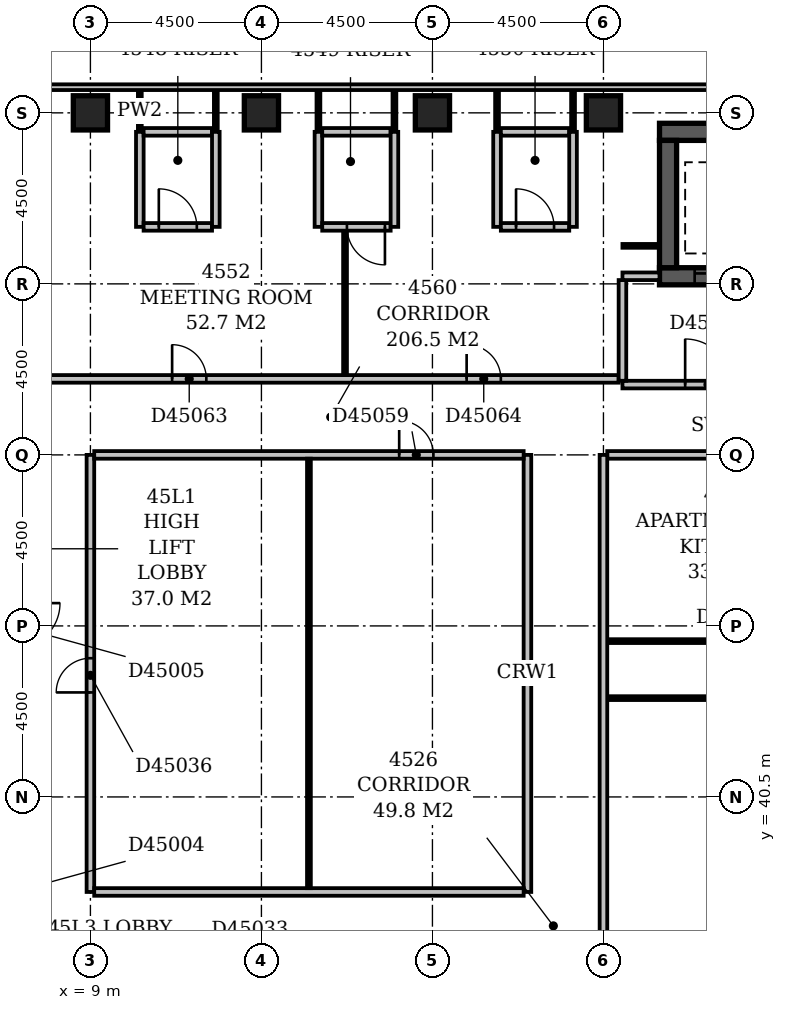
"""IFC4 building model, lengths in metres.
Left out: names, types, materials, properties, quantities, classifications, styles, units other than length and angle.
Written with IfcOpenShell. Run it as: python <this file> out.ifc"""

import sys

from ifc_helpers import new_model, si_unit, direction, frame, frame_2d, origin, origin_2d, place, context, subcontext, project, spatial, rectangle, extrude, element, fill, save


model = new_model("IFC4")
c1 = context("Model", 3, precision=1e-05, world=origin(), true_north=direction((0.0, 1.0)))
c2 = subcontext(c1, "Body", "Model", "MODEL_VIEW")
j1 = project(units=[si_unit("LENGTHUNIT", "METRE"), si_unit("PLANEANGLEUNIT", "RADIAN")], contexts=[c1])
p1 = place(None, origin())
s1 = spatial("IfcSite", under=j1, at=p1, CompositionType="ELEMENT")
p2 = place(p1, origin())
s2 = spatial("IfcBuilding", under=s1, at=p2, CompositionType="ELEMENT")
p3 = place(p2, frame((0.0, 0.0, 179.0)))
s3 = spatial("IfcBuildingStorey", under=s2, at=p3, CompositionType="ELEMENT", Elevation=179.0)
p4 = place(p3, frame((23.975, 54.2, -0.3), z_axis=(0.0, 0.0, 1.0), x_axis=(1.0, 0.0, 0.0)))
e1 = element("IfcWall", 1, at=p4, inside=s3, PredefinedType="SHEAR", context=c2, shape_type="SweptSolid", body=[
    extrude(rectangle(XDim=2.95, YDim=0.45, at=frame_2d((1.475, 0.0))), origin(), (0.0, 0.0, 1.0), 3.6),
])
p5 = place(p4, frame((0.925, 0.0, 0.3)))
e2 = element("IfcOpeningElement", 2, at=p5, cuts=e1, PredefinedType="OPENING", context=c2, shape_type="SweptSolid", body=[
    extrude(rectangle(XDim=1.1, YDim=2.1, at=frame_2d((0.55, 1.05))), frame((0.0, 0.237, 0.0), z_axis=(0.0, -1.0, 0.0), x_axis=(1.0, 0.0, 0.0)), (0.0, 0.0, 1.0), 0.474),
])
p6 = place(p3, frame((23.975, 58.0, -0.3), z_axis=(0.0, 0.0, 1.0), x_axis=(1.0, 0.0, 0.0)))
e3 = element("IfcWall", 3, at=p6, inside=s3, PredefinedType="SHEAR", context=c2, shape_type="SweptSolid", body=[
    extrude(rectangle(XDim=2.95, YDim=0.45, at=frame_2d((1.475, 0.0))), origin(), (0.0, 0.0, 1.0), 3.6),
])
p7 = place(p3, frame((24.2, 54.425, -0.3), z_axis=(0.0, 0.0, 1.0), x_axis=(0.0, 1.0, 0.0)))
e4 = element("IfcWall", 4, at=p7, inside=s3, PredefinedType="SHEAR", context=c2, shape_type="SweptSolid", body=[
    extrude(rectangle(XDim=3.35, YDim=0.45, at=frame_2d((1.675, 0.0))), origin(), (0.0, 0.0, 1.0), 3.6),
])
for number, where, z_axis, x_axis in (
    (5, (9.0, 58.5, -0.3), (0.0, 0.0, 1.0), (1.0, 0.0, 0.0)),
    (6, (13.5, 58.5, -0.3), (0.0, 0.0, 1.0), (1.0, 0.0, 0.0)),
    (7, (18.0, 58.5, -0.3), (0.0, 0.0, 1.0), (1.0, 0.0, 0.0)),
    (8, (22.5, 58.5, -0.3), (0.0, 0.0, 1.0), (1.0, 0.0, 0.0)),
):
    element("IfcColumn", number, at=place(p3, frame(where, z_axis=z_axis, x_axis=x_axis)), inside=s3, PredefinedType="COLUMN", context=c2, shape_type="SweptSolid", body=[
        extrude(rectangle(XDim=0.9, YDim=0.9, at=origin_2d()), origin(), (0.0, 0.0, 1.0), 3.6),
    ])
p8 = place(p3, frame((68.1, 59.175, 0.0), z_axis=(0.0, 0.0, 1.0), x_axis=(-1.0, 0.0, 0.0)))
e9 = element("IfcWall", 9, at=p8, inside=s3, PredefinedType="STANDARD", context=c2, shape_type="SweptSolid", body=[
    extrude(rectangle(XDim=68.85, YDim=0.15, at=frame_2d((34.425, 0.0))), origin(), (0.0, 0.0, 1.0), 2.7),
])
p9 = place(p3, frame((23.0, 51.35, 0.0), z_axis=(0.0, 0.0, 1.0), x_axis=(1.0, 0.0, 0.0)))
e10 = element("IfcWall", 10, at=p9, inside=s3, PredefinedType="PARTITIONING", context=c2, shape_type="SweptSolid", body=[
    extrude(rectangle(XDim=4.8, YDim=0.2, at=frame_2d((2.4, 0.0))), origin(), (0.0, 0.0, 1.0), 3.3),
])
p10 = place(p9, frame((1.65, 0.0, 0.0)))
e11 = element("IfcOpeningElement", 11, at=p10, cuts=e10, PredefinedType="OPENING", context=c2, shape_type="SweptSolid", body=[
    extrude(rectangle(XDim=1.2, YDim=2.1, at=frame_2d((0.6, 1.05))), frame((0.0, 0.112, 0.0), z_axis=(0.0, -1.0, 0.0), x_axis=(1.0, 0.0, 0.0)), (0.0, 0.0, 1.0), 0.224),
])
p11 = place(p3, frame((23.0, 54.2, 0.0), z_axis=(0.0, 0.0, 1.0), x_axis=(1.0, 0.0, 0.0)))
e12 = element("IfcWall", 12, at=p11, inside=s3, PredefinedType="PARTITIONING", context=c2, shape_type="SweptSolid", body=[
    extrude(rectangle(XDim=0.975, YDim=0.2, at=frame_2d((0.488, 0.0))), origin(), (0.0, 0.0, 1.0), 3.3),
])
p12 = place(p3, frame((23.0, 51.45, 0.0), z_axis=(0.0, 0.0, 1.0), x_axis=(0.0, 1.0, 0.0)))
e13 = element("IfcWall", 13, at=p12, inside=s3, PredefinedType="PARTITIONING", context=c2, shape_type="SweptSolid", body=[
    extrude(rectangle(XDim=2.65, YDim=0.2, at=frame_2d((1.325, 0.0))), origin(), (0.0, 0.0, 1.0), 3.3),
])
p13 = place(p3, frame((22.5, 36.45, 0.0), z_axis=(0.0, 0.0, 1.0), x_axis=(0.0, 1.0, 0.0)))
e14 = element("IfcWall", 14, at=p13, inside=s3, PredefinedType="PARTITIONING", context=c2, shape_type="SweptSolid", body=[
    extrude(rectangle(XDim=13.05, YDim=0.2, at=frame_2d((6.525, 0.0))), origin(), (0.0, 0.0, 1.0), 3.3),
])
p14 = place(p3, frame((9.0, 38.0, 0.0), z_axis=(0.0, 0.0, 1.0), x_axis=(0.0, 1.0, 0.0)))
e15 = element("IfcWall", 15, at=p14, inside=s3, PredefinedType="PARTITIONING", context=c2, shape_type="SweptSolid", body=[
    extrude(rectangle(XDim=11.5, YDim=0.2, at=frame_2d((5.75, 0.0))), origin(), (0.0, 0.0, 1.0), 3.3),
])
p15 = place(p14, frame((5.25, 0.0, 0.0)))
e16 = element("IfcOpeningElement", 16, at=p15, cuts=e15, PredefinedType="OPENING", context=c2, shape_type="SweptSolid", body=[
    extrude(rectangle(XDim=0.9, YDim=2.1, at=frame_2d((0.45, 1.05))), frame((0.0, 0.112, 0.0), z_axis=(0.0, -1.0, 0.0), x_axis=(1.0, 0.0, 0.0)), (0.0, 0.0, 1.0), 0.224),
])
p16 = place(p3, frame((9.1, 38.0, 0.0), z_axis=(0.0, 0.0, 1.0), x_axis=(1.0, 0.0, 0.0)))
e17 = element("IfcWall", 17, at=p16, inside=s3, PredefinedType="PARTITIONING", context=c2, shape_type="SweptSolid", body=[
    extrude(rectangle(XDim=11.3, YDim=0.2, at=frame_2d((5.65, 0.0))), origin(), (0.0, 0.0, 1.0), 3.3),
])
p17 = place(p3, frame((20.5, 38.0, 0.0), z_axis=(0.0, 0.0, 1.0), x_axis=(0.0, 1.0, 0.0)))
e18 = element("IfcWall", 18, at=p17, inside=s3, PredefinedType="PARTITIONING", context=c2, shape_type="SweptSolid", body=[
    extrude(rectangle(XDim=11.5, YDim=0.2, at=frame_2d((5.75, 0.0))), origin(), (0.0, 0.0, 1.0), 3.3),
])
p18 = place(p3, frame((14.75, 38.1, 0.0), z_axis=(0.0, 0.0, 1.0), x_axis=(0.0, 1.0, 0.0)))
e19 = element("IfcWall", 19, at=p18, inside=s3, PredefinedType="PARTITIONING", context=c2, shape_type="SweptSolid", body=[
    extrude(rectangle(XDim=11.3, YDim=0.1, at=frame_2d((5.65, 0.0))), origin(), (0.0, 0.0, 1.0), 3.3),
])
p19 = place(p3, frame((22.6, 43.1, 0.0), z_axis=(0.0, 0.0, 1.0), x_axis=(1.0, 0.0, 0.0)))
e20 = element("IfcWall", 20, at=p19, inside=s3, PredefinedType="PARTITIONING", context=c2, shape_type="SweptSolid", body=[
    extrude(rectangle(XDim=17.8, YDim=0.1, at=frame_2d((8.9, 0.0))), origin(), (0.0, 0.0, 1.0), 3.3),
])
p20 = place(p19, frame((3.9, 0.0, 0.0)))
e21 = element("IfcOpeningElement", 21, at=p20, cuts=e20, PredefinedType="OPENING", context=c2, shape_type="SweptSolid", body=[
    extrude(rectangle(XDim=0.9, YDim=2.1, at=frame_2d((0.45, 1.05))), frame((0.0, 0.062, 0.0), z_axis=(0.0, -1.0, 0.0), x_axis=(1.0, 0.0, 0.0)), (0.0, 0.0, 1.0), 0.124),
])
p21 = place(p19, frame((10.7, 0.0, 0.0)))
e22 = element("IfcOpeningElement", 22, at=p21, cuts=e20, PredefinedType="OPENING", context=c2, shape_type="SweptSolid", body=[
    extrude(rectangle(XDim=0.9, YDim=2.1, at=frame_2d((0.45, 1.05))), frame((0.0, 0.062, 0.0), z_axis=(0.0, -1.0, 0.0), x_axis=(1.0, 0.0, 0.0)), (0.0, 0.0, 1.0), 0.124),
])
p22 = place(p19, frame((14.05, 0.0, 0.0)))
e23 = element("IfcOpeningElement", 23, at=p22, cuts=e20, PredefinedType="OPENING", context=c2, shape_type="SweptSolid", body=[
    extrude(rectangle(XDim=0.9, YDim=2.1, at=frame_2d((0.45, 1.05))), frame((0.0, 0.062, 0.0), z_axis=(0.0, -1.0, 0.0), x_axis=(1.0, 0.0, 0.0)), (0.0, 0.0, 1.0), 0.124),
])
p23 = place(p3, frame((22.6, 44.6, 0.0), z_axis=(0.0, 0.0, 1.0), x_axis=(1.0, 0.0, 0.0)))
e24 = element("IfcWall", 24, at=p23, inside=s3, PredefinedType="PARTITIONING", context=c2, shape_type="SweptSolid", body=[
    extrude(rectangle(XDim=6.75, YDim=0.1, at=frame_2d((3.375, 0.0))), origin(), (0.0, 0.0, 1.0), 3.3),
])
p24 = place(p23, frame((2.9, 0.0, 0.0)))
e25 = element("IfcOpeningElement", 25, at=p24, cuts=e24, PredefinedType="OPENING", context=c2, shape_type="SweptSolid", body=[
    extrude(rectangle(XDim=0.9, YDim=2.1, at=frame_2d((0.45, 1.05))), frame((0.0, 0.062, 0.0), z_axis=(0.0, -1.0, 0.0), x_axis=(1.0, 0.0, 0.0)), (0.0, 0.0, 1.0), 0.124),
])
p25 = place(p3, frame((9.1, 49.5, 0.0), z_axis=(0.0, 0.0, 1.0), x_axis=(1.0, 0.0, 0.0)))
e26 = element("IfcWall", 26, at=p25, inside=s3, PredefinedType="PARTITIONING", context=c2, shape_type="SweptSolid", body=[
    extrude(rectangle(XDim=11.3, YDim=0.2, at=frame_2d((5.65, 0.0))), origin(), (0.0, 0.0, 1.0), 3.3),
])
p26 = place(p25, frame((8.025, 0.0, 0.0)))
e27 = element("IfcOpeningElement", 27, at=p26, cuts=e26, PredefinedType="OPENING", context=c2, shape_type="SweptSolid", body=[
    extrude(rectangle(XDim=0.9, YDim=2.1, at=frame_2d((0.45, 1.05))), frame((0.0, 0.112, 0.0), z_axis=(0.0, -1.0, 0.0), x_axis=(1.0, 0.0, 0.0)), (0.0, 0.0, 1.0), 0.224),
])
p27 = place(p3, frame((22.6, 49.5, 0.0), z_axis=(0.0, 0.0, 1.0), x_axis=(1.0, 0.0, 0.0)))
e28 = element("IfcWall", 28, at=p27, inside=s3, PredefinedType="PARTITIONING", context=c2, shape_type="SweptSolid", body=[
    extrude(rectangle(XDim=44.45, YDim=0.2, at=frame_2d((22.225, 0.0))), origin(), (0.0, 0.0, 1.0), 3.3),
])
p28 = place(p27, frame((7.1, 0.0, 0.0)))
e29 = element("IfcOpeningElement", 29, at=p28, cuts=e28, PredefinedType="OPENING", context=c2, shape_type="SweptSolid", body=[
    extrude(rectangle(XDim=1.0, YDim=2.1, at=frame_2d((0.5, 1.05))), frame((0.0, 0.112, 0.0), z_axis=(0.0, -1.0, 0.0), x_axis=(1.0, 0.0, 0.0)), (0.0, 0.0, 1.0), 0.224),
])
p29 = place(p27, frame((26.1, 0.0, 0.0)))
e30 = element("IfcOpeningElement", 30, at=p29, cuts=e28, PredefinedType="OPENING", context=c2, shape_type="SweptSolid", body=[
    extrude(rectangle(XDim=1.0, YDim=2.1, at=frame_2d((0.5, 1.05))), frame((0.0, 0.112, 0.0), z_axis=(0.0, -1.0, 0.0), x_axis=(1.0, 0.0, 0.0)), (0.0, 0.0, 1.0), 0.224),
])
p30 = place(p27, frame((31.7, 0.0, 0.0)))
e31 = element("IfcOpeningElement", 31, at=p30, cuts=e28, PredefinedType="OPENING", context=c2, shape_type="SweptSolid", body=[
    extrude(rectangle(XDim=1.0, YDim=2.1, at=frame_2d((0.5, 1.05))), frame((0.0, 0.112, 0.0), z_axis=(0.0, -1.0, 0.0), x_axis=(1.0, 0.0, 0.0)), (0.0, 0.0, 1.0), 0.224),
])
p31 = place(p3, frame((7.6, 51.5, 0.0), z_axis=(0.0, 0.0, 1.0), x_axis=(1.0, 0.0, 0.0)))
e32 = element("IfcWall", 32, at=p31, inside=s3, PredefinedType="PARTITIONING", context=c2, shape_type="SweptSolid", body=[
    extrude(rectangle(XDim=15.3, YDim=0.2, at=frame_2d((7.65, 0.0))), origin(), (0.0, 0.0, 1.0), 3.3),
])
p32 = place(p31, frame((3.55, 0.0, 0.0)))
e33 = element("IfcOpeningElement", 33, at=p32, cuts=e32, PredefinedType="OPENING", context=c2, shape_type="SweptSolid", body=[
    extrude(rectangle(XDim=0.9, YDim=2.1, at=frame_2d((0.45, 1.05))), frame((0.0, 0.112, 0.0), z_axis=(0.0, -1.0, 0.0), x_axis=(1.0, 0.0, 0.0)), (0.0, 0.0, 1.0), 0.224),
])
p33 = place(p31, frame((11.3, 0.0, 0.0)))
e34 = element("IfcOpeningElement", 34, at=p33, cuts=e32, PredefinedType="OPENING", context=c2, shape_type="SweptSolid", body=[
    extrude(rectangle(XDim=0.9, YDim=2.1, at=frame_2d((0.45, 1.05))), frame((0.0, 0.112, 0.0), z_axis=(0.0, -1.0, 0.0), x_axis=(1.0, 0.0, 0.0)), (0.0, 0.0, 1.0), 0.224),
])
p34 = place(p3, frame((15.7, 51.6, 0.0), z_axis=(0.0, 0.0, 1.0), x_axis=(0.0, 1.0, 0.0)))
e35 = element("IfcWall", 35, at=p34, inside=s3, PredefinedType="PARTITIONING", context=c2, shape_type="SweptSolid", body=[
    extrude(rectangle(XDim=3.8, YDim=0.1, at=frame_2d((1.9, 0.0))), origin(), (0.0, 0.0, 1.0), 3.3),
])
p35 = place(p3, frame((23.0, 55.0, 0.0), z_axis=(0.0, 0.0, 1.0), x_axis=(1.0, 0.0, 0.0)))
e36 = element("IfcWall", 36, at=p35, inside=s3, PredefinedType="PARTITIONING", context=c2, shape_type="SweptSolid", body=[
    extrude(rectangle(XDim=0.975, YDim=0.1, at=frame_2d((0.488, 0.0))), origin(), (0.0, 0.0, 1.0), 3.3),
])
p36 = place(p3, frame((10.3, 55.5, 0.0), z_axis=(0.0, 0.0, 1.0), x_axis=(0.0, 1.0, 0.0)))
e37 = element("IfcWall", 37, at=p36, inside=s3, PredefinedType="PARTITIONING", context=c2, shape_type="SweptSolid", body=[
    extrude(rectangle(XDim=2.5, YDim=0.2, at=frame_2d((1.25, 0.0))), origin(), (0.0, 0.0, 1.0), 3.3),
])
p37 = place(p3, frame((10.4, 55.5, 0.0), z_axis=(0.0, 0.0, 1.0), x_axis=(1.0, 0.0, 0.0)))
e38 = element("IfcWall", 38, at=p37, inside=s3, PredefinedType="PARTITIONING", context=c2, shape_type="SweptSolid", body=[
    extrude(rectangle(XDim=1.8, YDim=0.2, at=frame_2d((0.9, 0.0))), origin(), (0.0, 0.0, 1.0), 3.3),
])
p38 = place(p37, frame((0.4, 0.0, 0.0)))
e39 = element("IfcOpeningElement", 39, at=p38, cuts=e38, PredefinedType="OPENING", context=c2, shape_type="SweptSolid", body=[
    extrude(rectangle(XDim=1.0, YDim=2.1, at=frame_2d((0.5, 1.05))), frame((0.0, 0.112, 0.0), z_axis=(0.0, -1.0, 0.0), x_axis=(1.0, 0.0, 0.0)), (0.0, 0.0, 1.0), 0.224),
])
for number, where, z_axis, x_axis in (
    (40, (12.3, 55.5, 0.0), (0.0, 0.0, 1.0), (0.0, 1.0, 0.0)),
    (41, (15.0, 55.5, 0.0), (0.0, 0.0, 1.0), (0.0, 1.0, 0.0)),
):
    element("IfcWall", number, at=place(p3, frame(where, z_axis=z_axis, x_axis=x_axis)), inside=s3, PredefinedType="PARTITIONING", context=c2, shape_type="SweptSolid", body=[
        extrude(rectangle(XDim=2.5, YDim=0.2, at=frame_2d((1.25, 0.0))), origin(), (0.0, 0.0, 1.0), 3.3),
    ])
p39 = place(p3, frame((15.1, 55.5, 0.0), z_axis=(0.0, 0.0, 1.0), x_axis=(1.0, 0.0, 0.0)))
e42 = element("IfcWall", 42, at=p39, inside=s3, PredefinedType="PARTITIONING", context=c2, shape_type="SweptSolid", body=[
    extrude(rectangle(XDim=1.8, YDim=0.2, at=frame_2d((0.9, 0.0))), origin(), (0.0, 0.0, 1.0), 3.3),
])
p40 = place(p39, frame((0.65, 0.0, 0.0)))
e43 = element("IfcOpeningElement", 43, at=p40, cuts=e42, PredefinedType="OPENING", context=c2, shape_type="SweptSolid", body=[
    extrude(rectangle(XDim=1.0, YDim=2.1, at=frame_2d((0.5, 1.05))), frame((0.0, 0.112, 0.0), z_axis=(0.0, -1.0, 0.0), x_axis=(1.0, 0.0, 0.0)), (0.0, 0.0, 1.0), 0.224),
])
for number, where, z_axis, x_axis in (
    (44, (17.0, 55.5, 0.0), (0.0, 0.0, 1.0), (0.0, 1.0, 0.0)),
    (45, (19.7, 55.5, 0.0), (0.0, 0.0, 1.0), (0.0, 1.0, 0.0)),
):
    element("IfcWall", number, at=place(p3, frame(where, z_axis=z_axis, x_axis=x_axis)), inside=s3, PredefinedType="PARTITIONING", context=c2, shape_type="SweptSolid", body=[
        extrude(rectangle(XDim=2.5, YDim=0.2, at=frame_2d((1.25, 0.0))), origin(), (0.0, 0.0, 1.0), 3.3),
    ])
p41 = place(p3, frame((19.8, 55.5, 0.0), z_axis=(0.0, 0.0, 1.0), x_axis=(1.0, 0.0, 0.0)))
e46 = element("IfcWall", 46, at=p41, inside=s3, PredefinedType="PARTITIONING", context=c2, shape_type="SweptSolid", body=[
    extrude(rectangle(XDim=1.8, YDim=0.2, at=frame_2d((0.9, 0.0))), origin(), (0.0, 0.0, 1.0), 3.3),
])
p42 = place(p41, frame((0.4, 0.0, 0.0)))
e47 = element("IfcOpeningElement", 47, at=p42, cuts=e46, PredefinedType="OPENING", context=c2, shape_type="SweptSolid", body=[
    extrude(rectangle(XDim=1.0, YDim=2.1, at=frame_2d((0.5, 1.05))), frame((0.0, 0.112, 0.0), z_axis=(0.0, -1.0, 0.0), x_axis=(1.0, 0.0, 0.0)), (0.0, 0.0, 1.0), 0.224),
])
p43 = place(p3, frame((21.7, 55.5, 0.0), z_axis=(0.0, 0.0, 1.0), x_axis=(0.0, 1.0, 0.0)))
e48 = element("IfcWall", 48, at=p43, inside=s3, PredefinedType="PARTITIONING", context=c2, shape_type="SweptSolid", body=[
    extrude(rectangle(XDim=2.5, YDim=0.2, at=frame_2d((1.25, 0.0))), origin(), (0.0, 0.0, 1.0), 3.3),
])
p44 = place(p3, frame((10.3, 58.0, 0.0), z_axis=(0.0, 0.0, 1.0), x_axis=(0.0, 1.0, 0.0)))
e49 = element("IfcWall", 49, at=p44, inside=s3, PredefinedType="PARTITIONING", context=c2, shape_type="SweptSolid", body=[
    extrude(rectangle(XDim=1.1, YDim=0.1, at=frame_2d((0.55, 0.0))), origin(), (0.0, 0.0, 1.0), 3.3),
])
p45 = place(p3, frame((10.4, 58.0, 0.0), z_axis=(0.0, 0.0, 1.0), x_axis=(1.0, 0.0, 0.0)))
e50 = element("IfcWall", 50, at=p45, inside=s3, PredefinedType="PARTITIONING", context=c2, shape_type="SweptSolid", body=[
    extrude(rectangle(XDim=1.8, YDim=0.2, at=frame_2d((0.9, 0.0))), origin(), (0.0, 0.0, 1.0), 3.3),
])
for number, where, z_axis, x_axis in (
    (51, (12.3, 58.0, 0.0), (0.0, 0.0, 1.0), (0.0, 1.0, 0.0)),
    (52, (15.0, 58.0, 0.0), (0.0, 0.0, 1.0), (0.0, 1.0, 0.0)),
):
    element("IfcWall", number, at=place(p3, frame(where, z_axis=z_axis, x_axis=x_axis)), inside=s3, PredefinedType="PARTITIONING", context=c2, shape_type="SweptSolid", body=[
        extrude(rectangle(XDim=1.1, YDim=0.1, at=frame_2d((0.55, 0.0))), origin(), (0.0, 0.0, 1.0), 3.3),
    ])
p46 = place(p3, frame((15.1, 58.0, 0.0), z_axis=(0.0, 0.0, 1.0), x_axis=(1.0, 0.0, 0.0)))
e53 = element("IfcWall", 53, at=p46, inside=s3, PredefinedType="PARTITIONING", context=c2, shape_type="SweptSolid", body=[
    extrude(rectangle(XDim=1.8, YDim=0.2, at=frame_2d((0.9, 0.0))), origin(), (0.0, 0.0, 1.0), 3.3),
])
for number, where, z_axis, x_axis in (
    (54, (17.0, 58.0, 0.0), (0.0, 0.0, 1.0), (0.0, 1.0, 0.0)),
    (55, (19.7, 58.0, 0.0), (0.0, 0.0, 1.0), (0.0, 1.0, 0.0)),
):
    element("IfcWall", number, at=place(p3, frame(where, z_axis=z_axis, x_axis=x_axis)), inside=s3, PredefinedType="PARTITIONING", context=c2, shape_type="SweptSolid", body=[
        extrude(rectangle(XDim=1.1, YDim=0.1, at=frame_2d((0.55, 0.0))), origin(), (0.0, 0.0, 1.0), 3.3),
    ])
p47 = place(p3, frame((19.8, 58.0, 0.0), z_axis=(0.0, 0.0, 1.0), x_axis=(1.0, 0.0, 0.0)))
e56 = element("IfcWall", 56, at=p47, inside=s3, PredefinedType="PARTITIONING", context=c2, shape_type="SweptSolid", body=[
    extrude(rectangle(XDim=1.8, YDim=0.2, at=frame_2d((0.9, 0.0))), origin(), (0.0, 0.0, 1.0), 3.3),
])
p48 = place(p3, frame((21.7, 58.0, 0.0), z_axis=(0.0, 0.0, 1.0), x_axis=(0.0, 1.0, 0.0)))
e57 = element("IfcWall", 57, at=p48, inside=s3, PredefinedType="PARTITIONING", context=c2, shape_type="SweptSolid", body=[
    extrude(rectangle(XDim=1.1, YDim=0.1, at=frame_2d((0.55, 0.0))), origin(), (0.0, 0.0, 1.0), 3.3),
])
p49 = place(p10, origin())
e58 = element("IfcDoor", 58, at=p49, inside=s3, OperationType="SINGLE_SWING_LEFT", PredefinedType="DOOR", context=c2, shape_type="SweptSolid", body=[
    extrude(rectangle(XDim=1.2, YDim=2.1, at=frame_2d((0.6, 1.05))), frame((0.0, 0.025, 0.0), z_axis=(0.0, -1.0, 0.0), x_axis=(1.0, 0.0, 0.0)), (0.0, 0.0, 1.0), 0.05),
])
fill(e11, e58)
p50 = place(p5, origin())
e59 = element("IfcDoor", 59, at=p50, inside=s3, OperationType="SLIDING_TO_LEFT", PredefinedType="DOOR", context=c2, shape_type="SweptSolid", body=[
    extrude(rectangle(XDim=1.1, YDim=2.1, at=frame_2d((0.55, 1.05))), frame((0.0, 0.025, 0.0), z_axis=(0.0, -1.0, 0.0), x_axis=(1.0, 0.0, 0.0)), (0.0, 0.0, 1.0), 0.05),
])
fill(e2, e59)
p51 = place(p15, origin())
e60 = element("IfcDoor", 60, at=p51, inside=s3, OperationType="SINGLE_SWING_LEFT", PredefinedType="DOOR", context=c2, shape_type="SweptSolid", body=[
    extrude(rectangle(XDim=0.9, YDim=2.1, at=frame_2d((0.45, 1.05))), frame((0.0, 0.025, 0.0), z_axis=(0.0, -1.0, 0.0), x_axis=(1.0, 0.0, 0.0)), (0.0, 0.0, 1.0), 0.05),
])
fill(e16, e60)
p52 = place(p26, origin())
e61 = element("IfcDoor", 61, at=p52, inside=s3, OperationType="SINGLE_SWING_LEFT", PredefinedType="DOOR", context=c2, shape_type="SweptSolid", body=[
    extrude(rectangle(XDim=0.9, YDim=2.1, at=frame_2d((0.45, 1.05))), frame((0.0, 0.025, 0.0), z_axis=(0.0, -1.0, 0.0), x_axis=(1.0, 0.0, 0.0)), (0.0, 0.0, 1.0), 0.05),
])
fill(e27, e61)
p53 = place(p32, origin())
e62 = element("IfcDoor", 62, at=p53, inside=s3, OperationType="SINGLE_SWING_LEFT", PredefinedType="DOOR", context=c2, shape_type="SweptSolid", body=[
    extrude(rectangle(XDim=0.9, YDim=2.1, at=frame_2d((0.45, 1.05))), frame((0.0, 0.025, 0.0), z_axis=(0.0, -1.0, 0.0), x_axis=(1.0, 0.0, 0.0)), (0.0, 0.0, 1.0), 0.05),
])
fill(e33, e62)
p54 = place(p33, origin())
e63 = element("IfcDoor", 63, at=p54, inside=s3, OperationType="SINGLE_SWING_LEFT", PredefinedType="DOOR", context=c2, shape_type="SweptSolid", body=[
    extrude(rectangle(XDim=0.9, YDim=2.1, at=frame_2d((0.45, 1.05))), frame((0.0, 0.025, 0.0), z_axis=(0.0, -1.0, 0.0), x_axis=(1.0, 0.0, 0.0)), (0.0, 0.0, 1.0), 0.05),
])
fill(e34, e63)
p55 = place(p38, origin())
e64 = element("IfcDoor", 64, at=p55, inside=s3, OperationType="SINGLE_SWING_LEFT", PredefinedType="DOOR", context=c2, shape_type="SweptSolid", body=[
    extrude(rectangle(XDim=1.0, YDim=2.1, at=frame_2d((0.5, 1.05))), frame((0.0, 0.025, 0.0), z_axis=(0.0, -1.0, 0.0), x_axis=(1.0, 0.0, 0.0)), (0.0, 0.0, 1.0), 0.05),
])
fill(e39, e64)
p56 = place(p40, origin())
e65 = element("IfcDoor", 65, at=p56, inside=s3, OperationType="SINGLE_SWING_RIGHT", PredefinedType="DOOR", context=c2, shape_type="SweptSolid", body=[
    extrude(rectangle(XDim=1.0, YDim=2.1, at=frame_2d((0.5, 1.05))), frame((0.0, 0.025, 0.0), z_axis=(0.0, -1.0, 0.0), x_axis=(1.0, 0.0, 0.0)), (0.0, 0.0, 1.0), 0.05),
])
fill(e43, e65)
p57 = place(p42, origin())
e66 = element("IfcDoor", 66, at=p57, inside=s3, OperationType="SINGLE_SWING_LEFT", PredefinedType="DOOR", context=c2, shape_type="SweptSolid", body=[
    extrude(rectangle(XDim=1.0, YDim=2.1, at=frame_2d((0.5, 1.05))), frame((0.0, 0.025, 0.0), z_axis=(0.0, -1.0, 0.0), x_axis=(1.0, 0.0, 0.0)), (0.0, 0.0, 1.0), 0.05),
])
fill(e47, e66)
save(model, sys.argv[1])
